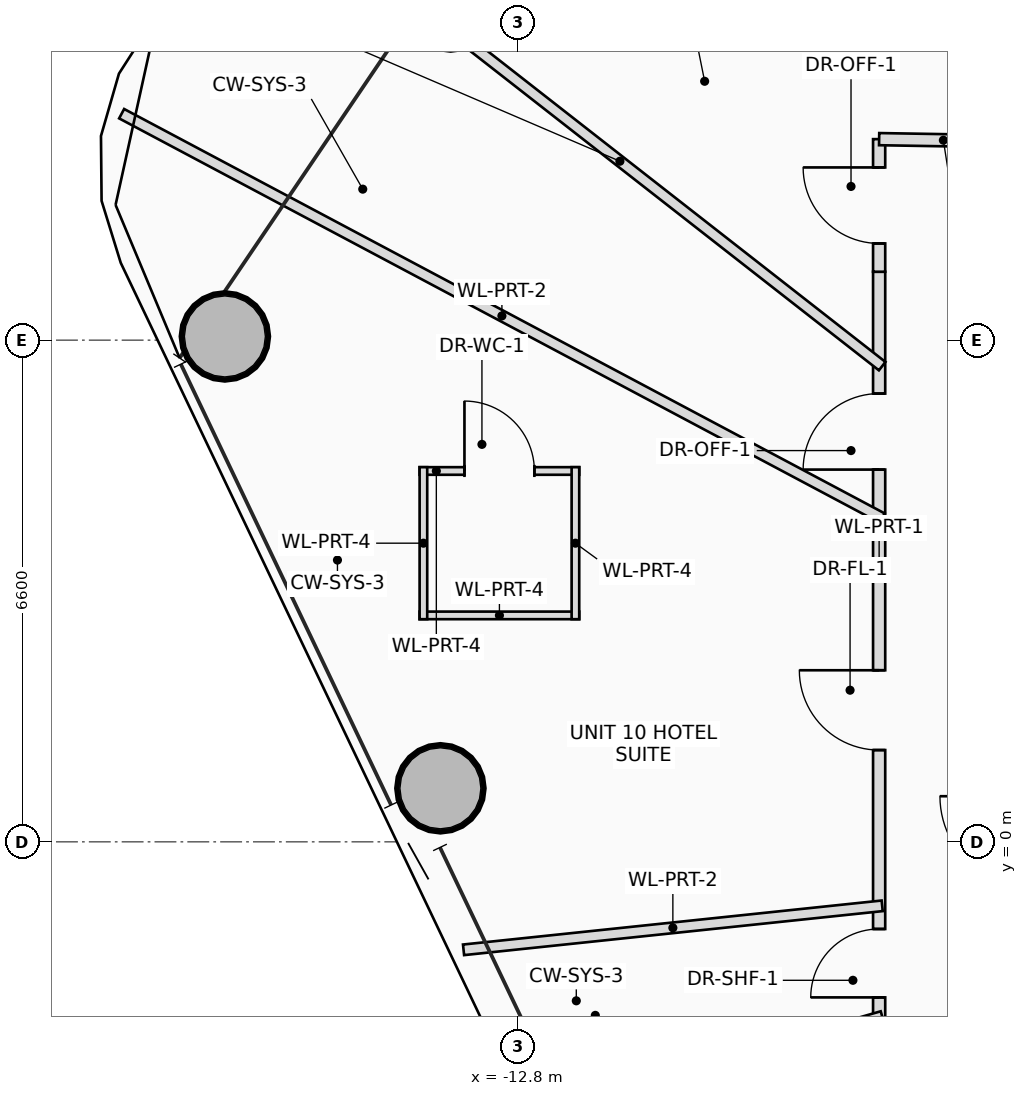
"""IFC4 building model, lengths in metres.
Left out: names, types, materials, properties, quantities, classifications, styles, units other than length and angle.
Written with IfcOpenShell. Run it as: python <this file> out.ifc"""

import sys

from ifc_helpers import new_model, si_unit, direction, frame, frame_2d, origin, origin_2d, place, context, subcontext, project, spatial, rectangle, hollow_circle, extrude, source, transform, mapped, element, fill, save


model = new_model("IFC4")
c1 = context("Model", 3, precision=1e-05, world=origin(), true_north=direction((0.0, 1.0)))
c2 = subcontext(c1, "Body", "Model", "MODEL_VIEW")
j1 = project(units=[si_unit("LENGTHUNIT", "METRE"), si_unit("PLANEANGLEUNIT", "RADIAN")], contexts=[c1])
p1 = place(None, origin())
s1 = spatial("IfcSite", under=j1, at=p1, CompositionType="ELEMENT")
p2 = place(p1, origin())
s2 = spatial("IfcBuilding", under=s1, at=p2, CompositionType="ELEMENT")
p3 = place(p2, frame((0.0, 0.0, 194.9)))
s3 = spatial("IfcBuildingStorey", under=s2, at=p3, CompositionType="ELEMENT", Elevation=194.9)
m1 = source(origin(), c2, "Body", "SweptSolid", [
    extrude(hollow_circle(Radius=0.575, WallThickness=0.042, at=origin_2d()), origin(), (0.0, 0.0, 1.0), 3.45),
])
for number, where, z_axis, x_axis in (
    (1, (-16.658, 6.649, 0.0), (0.0, 0.0, 1.0), (1.0, 0.0, 0.0)),
    (2, (-13.823, 0.704, 0.0), (0.0, 0.0, 1.0), (1.0, 0.0, 0.0)),
):
    element("IfcColumn", number, at=place(p3, frame(where, z_axis=z_axis, x_axis=x_axis)), inside=s3, PredefinedType="COLUMN", context=c2, shape_type="MappedRepresentation", body=[
        mapped(m1, transform((0.0, 0.0, 0.0), scale=1.0)),
    ])
p4 = place(p3, frame((-14.096, 4.879, 0.0), z_axis=(0.0, 0.0, 1.0), x_axis=(1.0, 0.0, 0.0)))
e3 = element("IfcWall", 3, at=p4, inside=s3, PredefinedType="PARTITIONING", context=c2, shape_type="SweptSolid", body=[
    extrude(rectangle(XDim=2.1, YDim=0.1, at=frame_2d((1.05, 0.0))), origin(), (0.0, 0.0, 1.0), 2.905),
])
p5 = place(p4, frame((0.59, 0.0, 0.0)))
e4 = element("IfcOpeningElement", 4, at=p5, cuts=e3, PredefinedType="OPENING", context=c2, shape_type="SweptSolid", body=[
    extrude(rectangle(XDim=0.92, YDim=2.1, at=frame_2d((0.46, 1.05))), frame((0.0, 0.06, 0.0), z_axis=(0.0, -1.0, 0.0), x_axis=(1.0, 0.0, 0.0)), (0.0, 0.0, 1.0), 0.12),
])
p6 = place(p3, frame((-11.996, 2.979, 0.0), z_axis=(0.0, 0.0, 1.0), x_axis=(-1.0, 0.0, 0.0)))
e5 = element("IfcWall", 5, at=p6, inside=s3, PredefinedType="PARTITIONING", context=c2, shape_type="SweptSolid", body=[
    extrude(rectangle(XDim=2.1, YDim=0.1, at=frame_2d((1.05, 0.0))), origin(), (0.0, 0.0, 1.0), 2.905),
])
for number, where, z_axis, x_axis in (
    (6, (-12.046, 4.929, 0.0), (0.0, 0.0, 1.0), (0.0, -1.0, 0.0)),
    (7, (-14.046, 2.929, 0.0), (0.0, 0.0, 1.0), (0.0, 1.0, 0.0)),
):
    element("IfcWall", number, at=place(p3, frame(where, z_axis=z_axis, x_axis=x_axis)), inside=s3, PredefinedType="PARTITIONING", context=c2, shape_type="SweptSolid", body=[
        extrude(rectangle(XDim=2.0, YDim=0.1, at=frame_2d((1.0, 0.0))), origin(), (0.0, 0.0, 1.0), 3.25),
    ])
p7 = place(p3, frame((-8.05, -7.5, 0.0), z_axis=(0.0, 0.0, 1.0), x_axis=(0.0, 1.0, 0.0)))
e8 = element("IfcWall", 8, at=p7, inside=s3, PredefinedType="PARTITIONING", context=c2, shape_type="SweptSolid", body=[
    extrude(rectangle(XDim=15.0, YDim=0.16, at=frame_2d((7.5, 0.0))), origin(), (0.0, 0.0, 1.0), 2.605),
])
p8 = place(p7, frame((2.177, 0.0, 0.0)))
e9 = element("IfcOpeningElement", 9, at=p8, cuts=e8, PredefinedType="OPENING", context=c2, shape_type="SweptSolid", body=[
    extrude(rectangle(XDim=1.0, YDim=2.25, at=frame_2d((0.5, 1.125))), frame((0.0, 0.09, 0.0), z_axis=(0.0, -1.0, 0.0), x_axis=(1.0, 0.0, 0.0)), (0.0, 0.0, 1.0), 0.18),
])
p9 = place(p7, frame((5.453, 0.0, 0.0)))
e10 = element("IfcOpeningElement", 10, at=p9, cuts=e8, PredefinedType="OPENING", context=c2, shape_type="SweptSolid", body=[
    extrude(rectangle(XDim=0.9, YDim=2.05, at=frame_2d((0.45, 1.025))), frame((0.0, 0.09, 0.0), z_axis=(0.0, -1.0, 0.0), x_axis=(1.0, 0.0, 0.0)), (0.0, 0.0, 1.0), 0.18),
])
p10 = place(p7, frame((8.707, 0.0, 0.0)))
e11 = element("IfcOpeningElement", 11, at=p10, cuts=e8, PredefinedType="OPENING", context=c2, shape_type="SweptSolid", body=[
    extrude(rectangle(XDim=1.05, YDim=2.2, at=frame_2d((0.525, 1.1))), frame((0.0, 0.09, 0.0), z_axis=(0.0, -1.0, 0.0), x_axis=(1.0, 0.0, 0.0)), (0.0, 0.0, 1.0), 0.18),
])
p11 = place(p7, frame((12.397, 0.0, 0.0)))
e12 = element("IfcOpeningElement", 12, at=p11, cuts=e8, PredefinedType="OPENING", context=c2, shape_type="SweptSolid", body=[
    extrude(rectangle(XDim=1.0, YDim=2.25, at=frame_2d((0.5, 1.125))), frame((0.0, 0.09, 0.0), z_axis=(0.0, -1.0, 0.0), x_axis=(1.0, 0.0, 0.0)), (0.0, 0.0, 1.0), 0.18),
])
p12 = place(p3, frame((-8.05, 7.5, 0.0), z_axis=(0.0, 0.0, 1.0), x_axis=(0.0, 1.0, 0.0)))
e13 = element("IfcWall", 13, at=p12, inside=s3, PredefinedType="PARTITIONING", context=c2, shape_type="SweptSolid", body=[
    extrude(rectangle(XDim=1.745, YDim=0.16, at=frame_2d((0.872, 0.0))), origin(), (0.0, 0.0, 1.0), 2.805),
])
p13 = place(p12, frame((0.372, 0.0, 0.0)))
e14 = element("IfcOpeningElement", 14, at=p13, cuts=e13, PredefinedType="OPENING", context=c2, shape_type="SweptSolid", body=[
    extrude(rectangle(XDim=1.0, YDim=2.25, at=frame_2d((0.5, 1.125))), frame((0.0, 0.09, 0.0), z_axis=(0.0, -1.0, 0.0), x_axis=(1.0, 0.0, 0.0)), (0.0, 0.0, 1.0), 0.18),
])
p14 = place(p3, frame((-8.05, 9.245, 0.0), z_axis=(0.0, 0.0, 1.0), x_axis=(0.999859611566, -0.016755809729, 0.0)))
e15 = element("IfcWall", 15, at=p14, inside=s3, PredefinedType="PARTITIONING", context=c2, shape_type="SweptSolid", body=[
    extrude(rectangle(XDim=1.69, YDim=0.16, at=frame_2d((0.845, 0.0))), origin(), (0.0, 0.0, 1.0), 2.905),
])
p15 = place(p3, frame((-8.01, 6.258, 0.0), z_axis=(0.0, 0.0, 1.0), x_axis=(-0.788015921071, 0.615654861216, 0.0)))
e16 = element("IfcWall", 16, at=p15, inside=s3, PredefinedType="PARTITIONING", context=c2, shape_type="SweptSolid", body=[
    extrude(rectangle(XDim=8.758, YDim=0.14, at=frame_2d((4.379, 0.0))), origin(), (0.0, 0.0, 1.0), 2.805),
])
p16 = place(p3, frame((-8.01, 4.259, 0.0), z_axis=(0.0, 0.0, 1.0), x_axis=(-0.882949150857, 0.469468632606, 0.0)))
e17 = element("IfcWall", 17, at=p16, inside=s3, PredefinedType="PARTITIONING", context=c2, shape_type="SweptSolid", body=[
    extrude(rectangle(XDim=11.333, YDim=0.14, at=frame_2d((5.667, 0.0))), origin(), (0.0, 0.0, 1.0), 2.605),
])
p17 = place(p3, frame((-8.01, -0.842, 0.0), z_axis=(0.0, 0.0, 1.0), x_axis=(-0.994518006468, -0.104565457063, 0.0)))
e18 = element("IfcWall", 18, at=p17, inside=s3, PredefinedType="PARTITIONING", context=c2, shape_type="SweptSolid", body=[
    extrude(rectangle(XDim=5.538, YDim=0.14, at=frame_2d((2.769, 0.0))), origin(), (0.0, 0.0, 1.0), 2.765),
])
p18 = place(p3, frame((-8.01, -2.297, 0.0), z_axis=(0.0, 0.0, 1.0), x_axis=(-0.961260451266, -0.275641696467, 0.0)))
e19 = element("IfcWall", 19, at=p18, inside=s3, PredefinedType="PARTITIONING", context=c2, shape_type="SweptSolid", body=[
    extrude(rectangle(XDim=4.658, YDim=0.14, at=frame_2d((2.329, 0.0))), origin(), (0.0, 0.0, 1.0), 2.765),
])
p19 = place(p5, origin())
e20 = element("IfcDoor", 20, at=p19, inside=s3, OperationType="SINGLE_SWING_LEFT", PredefinedType="DOOR", context=c2, shape_type="SweptSolid", body=[
    extrude(rectangle(XDim=0.92, YDim=2.1, at=frame_2d((0.46, 1.05))), frame((0.0, 0.025, 0.0), z_axis=(0.0, -1.0, 0.0), x_axis=(1.0, 0.0, 0.0)), (0.0, 0.0, 1.0), 0.05),
])
fill(e4, e20)
p20 = place(p9, origin())
e21 = element("IfcDoor", 21, at=p20, inside=s3, OperationType="SINGLE_SWING_LEFT", PredefinedType="DOOR", context=c2, shape_type="SweptSolid", body=[
    extrude(rectangle(XDim=0.9, YDim=2.05, at=frame_2d((0.45, 1.025))), frame((0.0, 0.025, 0.0), z_axis=(0.0, -1.0, 0.0), x_axis=(1.0, 0.0, 0.0)), (0.0, 0.0, 1.0), 0.05),
])
fill(e10, e21)
p21 = place(p10, origin())
e22 = element("IfcDoor", 22, at=p21, inside=s3, OperationType="SINGLE_SWING_RIGHT", PredefinedType="DOOR", context=c2, shape_type="SweptSolid", body=[
    extrude(rectangle(XDim=1.05, YDim=2.2, at=frame_2d((0.525, 1.1))), frame((0.0, 0.025, 0.0), z_axis=(0.0, -1.0, 0.0), x_axis=(1.0, 0.0, 0.0)), (0.0, 0.0, 1.0), 0.05),
])
fill(e11, e22)
p22 = place(p11, origin())
e23 = element("IfcDoor", 23, at=p22, inside=s3, OperationType="SINGLE_SWING_LEFT", PredefinedType="DOOR", context=c2, shape_type="SweptSolid", body=[
    extrude(rectangle(XDim=1.0, YDim=2.25, at=frame_2d((0.5, 1.125))), frame((0.0, 0.025, 0.0), z_axis=(0.0, -1.0, 0.0), x_axis=(1.0, 0.0, 0.0)), (0.0, 0.0, 1.0), 0.05),
])
fill(e12, e23)
p23 = place(p13, origin())
e24 = element("IfcDoor", 24, at=p23, inside=s3, OperationType="SINGLE_SWING_RIGHT", PredefinedType="DOOR", context=c2, shape_type="SweptSolid", body=[
    extrude(rectangle(XDim=1.0, YDim=2.25, at=frame_2d((0.5, 1.125))), frame((0.0, 0.025, 0.0), z_axis=(0.0, -1.0, 0.0), x_axis=(1.0, 0.0, 0.0)), (0.0, 0.0, 1.0), 0.05),
])
fill(e14, e24)
save(model, sys.argv[1])
